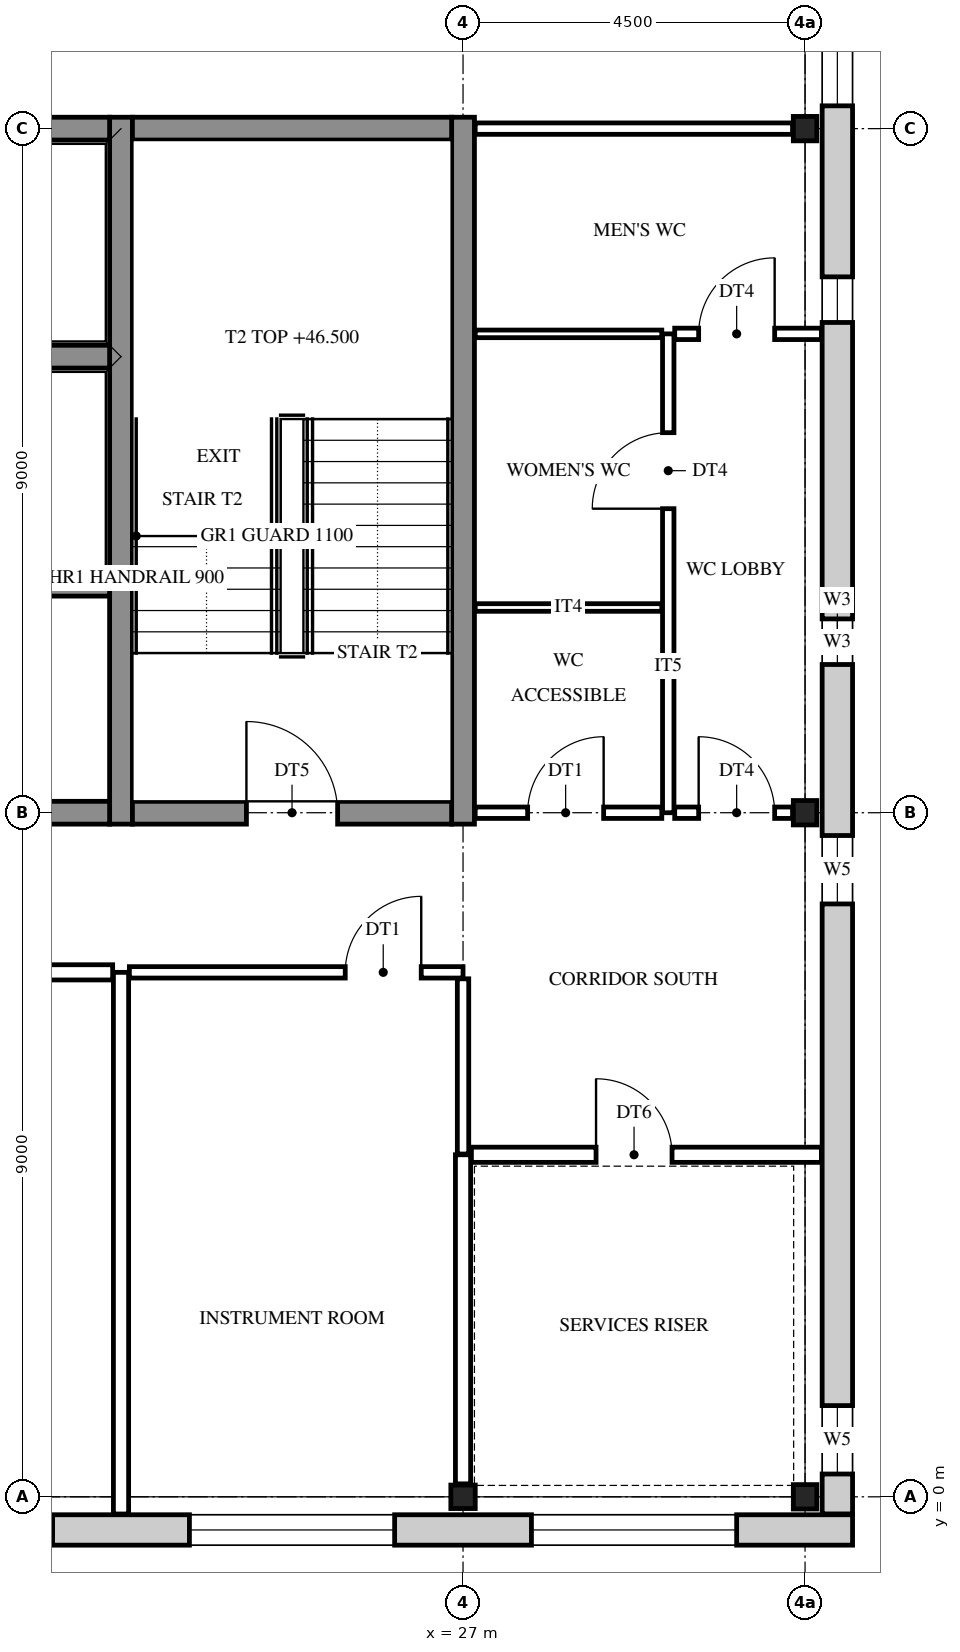
"""IFC4 building model, lengths in metres.
Left out: names, types, materials, properties, quantities, classifications, styles, units other than length and angle.
Written with IfcOpenShell. Run it as: python <this file> out.ifc"""

import sys

from ifc_helpers import new_model, si_unit, direction, frame, frame_2d, origin, origin_2d, place, context, subcontext, project, spatial, rectangle, i_section, extrude, element, fill, save


model = new_model("IFC4")
c1 = context("Model", 3, precision=1e-05, world=origin(), true_north=direction((0.0, 1.0)))
c2 = subcontext(c1, "Body", "Model", "MODEL_VIEW")
j1 = project(units=[si_unit("LENGTHUNIT", "METRE"), si_unit("PLANEANGLEUNIT", "RADIAN")], contexts=[c1])
p1 = place(None, origin())
s1 = spatial("IfcSite", under=j1, at=p1, CompositionType="ELEMENT")
p2 = place(p1, origin())
s2 = spatial("IfcBuilding", under=s1, at=p2, CompositionType="ELEMENT")
p3 = place(p2, frame((0.0, 0.0, 44.4)))
s3 = spatial("IfcBuildingStorey", under=s2, at=p3, CompositionType="ELEMENT", Elevation=44.4)
for number, where, z_axis, x_axis in (
    (1, (27.0, 0.0, 0.0), (0.0, 0.0, 1.0), (0.0, 1.0, 0.0)),
    (2, (31.5, 0.0, 0.0), (0.0, 0.0, 1.0), (1.0, 0.0, 0.0)),
    (3, (31.5, 9.0, 0.0), (0.0, 0.0, 1.0), (1.0, 0.0, 0.0)),
    (4, (31.5, 18.0, 0.0), (0.0, 0.0, 1.0), (1.0, 0.0, 0.0)),
):
    element("IfcColumn", number, at=place(p3, frame(where, z_axis=z_axis, x_axis=x_axis)), inside=s3, PredefinedType="COLUMN", context=c2, shape_type="SweptSolid", body=[
        extrude(i_section(OverallWidth=0.309, OverallDepth=0.321, WebThickness=0.014, FlangeThickness=0.022, FilletRadius=0.017, at=origin_2d()), origin(), (0.0, 0.0, 1.0), 4.2),
    ])
for number, where, z_axis, x_axis in (
    (5, (22.5, 8.85, 0.0), (0.0, 0.0, 1.0), (0.0, 1.0, 0.0)),
    (6, (27.0, 8.85, 0.0), (0.0, 0.0, 1.0), (0.0, 1.0, 0.0)),
):
    element("IfcWall", number, at=place(p3, frame(where, z_axis=z_axis, x_axis=x_axis)), inside=s3, PredefinedType="SHEAR", context=c2, shape_type="SweptSolid", body=[
        extrude(rectangle(XDim=9.3, YDim=0.3, at=frame_2d((4.65, 0.0))), origin(), (0.0, 0.0, 1.0), 4.2),
    ])
p4 = place(p3, frame((19.65, 9.0, 0.0), z_axis=(0.0, 0.0, 1.0), x_axis=(1.0, 0.0, 0.0)))
e7 = element("IfcWall", 7, at=p4, inside=s3, PredefinedType="SHEAR", context=c2, shape_type="SweptSolid", body=[
    extrude(rectangle(XDim=2.7, YDim=0.3, at=frame_2d((1.35, 0.0))), origin(), (0.0, 0.0, 1.0), 4.2),
])
p5 = place(p3, frame((22.65, 9.0, 0.0), z_axis=(0.0, 0.0, 1.0), x_axis=(1.0, 0.0, 0.0)))
e8 = element("IfcWall", 8, at=p5, inside=s3, PredefinedType="SHEAR", context=c2, shape_type="SweptSolid", body=[
    extrude(rectangle(XDim=4.2, YDim=0.3, at=frame_2d((2.1, 0.0))), origin(), (0.0, 0.0, 1.0), 4.2),
])
p6 = place(p5, frame((1.5, 0.0, 0.0)))
e9 = element("IfcOpeningElement", 9, at=p6, cuts=e8, PredefinedType="OPENING", context=c2, shape_type="SweptSolid", body=[
    extrude(rectangle(XDim=1.2, YDim=2.1, at=frame_2d((0.6, 1.05))), frame((0.0, 0.16, 0.0), z_axis=(0.0, -1.0, 0.0), x_axis=(1.0, 0.0, 0.0)), (0.0, 0.0, 1.0), 0.32),
])
for number, where, z_axis, x_axis in (
    (10, (19.65, 12.0, 0.0), (0.0, 0.0, 1.0), (1.0, 0.0, 0.0)),
    (11, (19.65, 15.0, 0.0), (0.0, 0.0, 1.0), (1.0, 0.0, 0.0)),
    (12, (19.65, 18.0, 0.0), (0.0, 0.0, 1.0), (1.0, 0.0, 0.0)),
):
    element("IfcWall", number, at=place(p3, frame(where, z_axis=z_axis, x_axis=x_axis)), inside=s3, PredefinedType="SHEAR", context=c2, shape_type="SweptSolid", body=[
        extrude(rectangle(XDim=2.7, YDim=0.3, at=frame_2d((1.35, 0.0))), origin(), (0.0, 0.0, 1.0), 4.2),
    ])
p7 = place(p3, frame((22.65, 18.0, 0.0), z_axis=(0.0, 0.0, 1.0), x_axis=(1.0, 0.0, 0.0)))
e13 = element("IfcWall", 13, at=p7, inside=s3, PredefinedType="SHEAR", context=c2, shape_type="SweptSolid", body=[
    extrude(rectangle(XDim=4.2, YDim=0.3, at=frame_2d((2.1, 0.0))), origin(), (0.0, 0.0, 1.0), 4.2),
])
p8 = place(p3, frame((32.125, -0.436, 0.0), z_axis=(0.0, 0.0, 1.0), x_axis=(-1.0, 0.0, 0.0)))
e14 = element("IfcWall", 14, at=p8, inside=s3, PredefinedType="STANDARD", context=c2, shape_type="SweptSolid", body=[
    extrude(rectangle(XDim=32.75, YDim=0.4, at=frame_2d((16.375, 0.0))), origin(), (0.0, 0.0, 1.0), 4.2),
])
p9 = place(p8, frame((28.525, 0.0, 0.9)))
e15 = element("IfcOpeningElement", 15, at=p9, cuts=e14, PredefinedType="OPENING", context=c2, shape_type="SweptSolid", body=[
    extrude(rectangle(XDim=2.7, YDim=2.5, at=frame_2d((1.35, 1.25))), frame((0.0, 0.21, 0.0), z_axis=(0.0, -1.0, 0.0), x_axis=(1.0, 0.0, 0.0)), (0.0, 0.0, 1.0), 0.42),
])
p10 = place(p8, frame((24.025, 0.0, 0.9)))
e16 = element("IfcOpeningElement", 16, at=p10, cuts=e14, PredefinedType="OPENING", context=c2, shape_type="SweptSolid", body=[
    extrude(rectangle(XDim=2.7, YDim=2.5, at=frame_2d((1.35, 1.25))), frame((0.0, 0.21, 0.0), z_axis=(0.0, -1.0, 0.0), x_axis=(1.0, 0.0, 0.0)), (0.0, 0.0, 1.0), 0.42),
])
p11 = place(p8, frame((19.525, 0.0, 0.9)))
e17 = element("IfcOpeningElement", 17, at=p11, cuts=e14, PredefinedType="OPENING", context=c2, shape_type="SweptSolid", body=[
    extrude(rectangle(XDim=2.7, YDim=2.5, at=frame_2d((1.35, 1.25))), frame((0.0, 0.21, 0.0), z_axis=(0.0, -1.0, 0.0), x_axis=(1.0, 0.0, 0.0)), (0.0, 0.0, 1.0), 0.42),
])
p12 = place(p8, frame((15.025, 0.0, 0.9)))
e18 = element("IfcOpeningElement", 18, at=p12, cuts=e14, PredefinedType="OPENING", context=c2, shape_type="SweptSolid", body=[
    extrude(rectangle(XDim=2.7, YDim=2.5, at=frame_2d((1.35, 1.25))), frame((0.0, 0.21, 0.0), z_axis=(0.0, -1.0, 0.0), x_axis=(1.0, 0.0, 0.0)), (0.0, 0.0, 1.0), 0.42),
])
p13 = place(p8, frame((10.525, 0.0, 0.9)))
e19 = element("IfcOpeningElement", 19, at=p13, cuts=e14, PredefinedType="OPENING", context=c2, shape_type="SweptSolid", body=[
    extrude(rectangle(XDim=2.7, YDim=2.5, at=frame_2d((1.35, 1.25))), frame((0.0, 0.21, 0.0), z_axis=(0.0, -1.0, 0.0), x_axis=(1.0, 0.0, 0.0)), (0.0, 0.0, 1.0), 0.42),
])
p14 = place(p8, frame((6.025, 0.0, 0.9)))
e20 = element("IfcOpeningElement", 20, at=p14, cuts=e14, PredefinedType="OPENING", context=c2, shape_type="SweptSolid", body=[
    extrude(rectangle(XDim=2.7, YDim=2.5, at=frame_2d((1.35, 1.25))), frame((0.0, 0.21, 0.0), z_axis=(0.0, -1.0, 0.0), x_axis=(1.0, 0.0, 0.0)), (0.0, 0.0, 1.0), 0.42),
])
p15 = place(p8, frame((1.525, 0.0, 0.9)))
e21 = element("IfcOpeningElement", 21, at=p15, cuts=e14, PredefinedType="OPENING", context=c2, shape_type="SweptSolid", body=[
    extrude(rectangle(XDim=2.7, YDim=2.5, at=frame_2d((1.35, 1.25))), frame((0.0, 0.21, 0.0), z_axis=(0.0, -1.0, 0.0), x_axis=(1.0, 0.0, 0.0)), (0.0, 0.0, 1.0), 0.42),
])
p16 = place(p3, frame((31.925, 27.225, 0.0), z_axis=(0.0, 0.0, 1.0), x_axis=(0.0, -1.0, 0.0)))
e22 = element("IfcWall", 22, at=p16, inside=s3, PredefinedType="STANDARD", context=c2, shape_type="SweptSolid", body=[
    extrude(rectangle(XDim=27.45, YDim=0.4, at=frame_2d((13.725, 0.0))), origin(), (0.0, 0.0, 1.0), 4.2),
])
p17 = place(p16, frame((26.025, 0.0, 0.9)))
e23 = element("IfcOpeningElement", 23, at=p17, cuts=e22, PredefinedType="OPENING", context=c2, shape_type="SweptSolid", body=[
    extrude(rectangle(XDim=0.9, YDim=2.0, at=frame_2d((0.45, 1.0))), frame((0.0, 0.21, 0.0), z_axis=(0.0, -1.0, 0.0), x_axis=(1.0, 0.0, 0.0)), (0.0, 0.0, 1.0), 0.42),
])
p18 = place(p16, frame((18.525, 0.0, 0.9)))
e24 = element("IfcOpeningElement", 24, at=p18, cuts=e22, PredefinedType="OPENING", context=c2, shape_type="SweptSolid", body=[
    extrude(rectangle(XDim=0.9, YDim=2.0, at=frame_2d((0.45, 1.0))), frame((0.0, 0.21, 0.0), z_axis=(0.0, -1.0, 0.0), x_axis=(1.0, 0.0, 0.0)), (0.0, 0.0, 1.0), 0.42),
])
p19 = place(p16, frame((15.675, 0.0, 1.6)))
e25 = element("IfcOpeningElement", 25, at=p19, cuts=e22, PredefinedType="OPENING", context=c2, shape_type="SweptSolid", body=[
    extrude(rectangle(XDim=0.6, YDim=0.9, at=frame_2d((0.3, 0.45))), frame((0.0, 0.21, 0.0), z_axis=(0.0, -1.0, 0.0), x_axis=(1.0, 0.0, 0.0)), (0.0, 0.0, 1.0), 0.42),
])
p20 = place(p16, frame((11.175, 0.0, 1.6)))
e26 = element("IfcOpeningElement", 26, at=p20, cuts=e22, PredefinedType="OPENING", context=c2, shape_type="SweptSolid", body=[
    extrude(rectangle(XDim=0.6, YDim=0.9, at=frame_2d((0.3, 0.45))), frame((0.0, 0.21, 0.0), z_axis=(0.0, -1.0, 0.0), x_axis=(1.0, 0.0, 0.0)), (0.0, 0.0, 1.0), 0.42),
])
p21 = place(p16, frame((8.025, 0.0, 0.9)))
e27 = element("IfcOpeningElement", 27, at=p21, cuts=e22, PredefinedType="OPENING", context=c2, shape_type="SweptSolid", body=[
    extrude(rectangle(XDim=0.9, YDim=2.0, at=frame_2d((0.45, 1.0))), frame((0.0, 0.21, 0.0), z_axis=(0.0, -1.0, 0.0), x_axis=(1.0, 0.0, 0.0)), (0.0, 0.0, 1.0), 0.42),
])
p22 = place(p16, frame((0.525, 0.0, 0.9)))
e28 = element("IfcOpeningElement", 28, at=p22, cuts=e22, PredefinedType="OPENING", context=c2, shape_type="SweptSolid", body=[
    extrude(rectangle(XDim=0.9, YDim=2.0, at=frame_2d((0.45, 1.0))), frame((0.0, 0.21, 0.0), z_axis=(0.0, -1.0, 0.0), x_axis=(1.0, 0.0, 0.0)), (0.0, 0.0, 1.0), 0.42),
])
p23 = place(p3, frame((22.5, -0.226, 0.0), z_axis=(0.0, 0.0, 1.0), x_axis=(0.0, 1.0, 0.0)))
e29 = element("IfcWall", 29, at=p23, inside=s3, PredefinedType="PARTITIONING", context=c2, shape_type="SweptSolid", body=[
    extrude(rectangle(XDim=7.126, YDim=0.2, at=frame_2d((3.563, 0.0))), origin(), (0.0, 0.0, 1.0), 3.542),
])
p24 = place(p3, frame((27.0, 0.17, 0.0), z_axis=(0.0, 0.0, 1.0), x_axis=(0.0, 1.0, 0.0)))
e30 = element("IfcWall", 30, at=p24, inside=s3, PredefinedType="PARTITIONING", context=c2, shape_type="SweptSolid", body=[
    extrude(rectangle(XDim=4.33, YDim=0.2, at=frame_2d((2.165, 0.0))), origin(), (0.0, 0.0, 1.0), 3.542),
])
p25 = place(p3, frame((27.0, 4.51, 0.0), z_axis=(0.0, 0.0, 1.0), x_axis=(0.0, 1.0, 0.0)))
e31 = element("IfcWall", 31, at=p25, inside=s3, PredefinedType="PARTITIONING", context=c2, shape_type="SweptSolid", body=[
    extrude(rectangle(XDim=2.305, YDim=0.15, at=frame_2d((1.152, 0.0))), origin(), (0.0, 0.0, 1.0), 3.542),
])
p26 = place(p3, frame((29.7, 9.0, 0.0), z_axis=(0.0, 0.0, 1.0), x_axis=(0.0, 1.0, 0.0)))
e32 = element("IfcWall", 32, at=p26, inside=s3, PredefinedType="PARTITIONING", context=c2, shape_type="SweptSolid", body=[
    extrude(rectangle(XDim=6.3, YDim=0.15, at=frame_2d((3.15, 0.0))), origin(), (0.0, 0.0, 1.0), 3.542),
])
p27 = place(p26, frame((4.0, 0.0, 0.0)))
e33 = element("IfcOpeningElement", 33, at=p27, cuts=e32, PredefinedType="OPENING", context=c2, shape_type="SweptSolid", body=[
    extrude(rectangle(XDim=1.0, YDim=2.1, at=frame_2d((0.5, 1.05))), frame((0.0, 0.085, 0.0), z_axis=(0.0, -1.0, 0.0), x_axis=(1.0, 0.0, 0.0)), (0.0, 0.0, 1.0), 0.17),
])
p28 = place(p3, frame((27.11, 4.5, 0.0), z_axis=(0.0, 0.0, 1.0), x_axis=(1.0, 0.0, 0.0)))
e34 = element("IfcWall", 34, at=p28, inside=s3, PredefinedType="PARTITIONING", context=c2, shape_type="SweptSolid", body=[
    extrude(rectangle(XDim=4.605, YDim=0.2, at=frame_2d((2.302, 0.0))), origin(), (0.0, 0.0, 1.0), 3.542),
])
p29 = place(p28, frame((1.64, 0.0, 0.0)))
e35 = element("IfcOpeningElement", 35, at=p29, cuts=e34, PredefinedType="OPENING", context=c2, shape_type="SweptSolid", body=[
    extrude(rectangle(XDim=1.0, YDim=2.1, at=frame_2d((0.5, 1.05))), frame((0.0, 0.11, 0.0), z_axis=(0.0, -1.0, 0.0), x_axis=(1.0, 0.0, 0.0)), (0.0, 0.0, 1.0), 0.22),
])
p30 = place(p3, frame((18.01, 6.9, 0.0), z_axis=(0.0, 0.0, 1.0), x_axis=(1.0, 0.0, 0.0)))
e36 = element("IfcWall", 36, at=p30, inside=s3, PredefinedType="PARTITIONING", context=c2, shape_type="SweptSolid", body=[
    extrude(rectangle(XDim=4.38, YDim=0.2, at=frame_2d((2.19, 0.0))), origin(), (0.0, 0.0, 1.0), 3.542),
])
p31 = place(p30, frame((1.74, 0.0, 0.0)))
e37 = element("IfcOpeningElement", 37, at=p31, cuts=e36, PredefinedType="OPENING", context=c2, shape_type="SweptSolid", body=[
    extrude(rectangle(XDim=1.0, YDim=2.1, at=frame_2d((0.5, 1.05))), frame((0.0, 0.11, 0.0), z_axis=(0.0, -1.0, 0.0), x_axis=(1.0, 0.0, 0.0)), (0.0, 0.0, 1.0), 0.22),
])
p32 = place(p3, frame((22.61, 6.9, 0.0), z_axis=(0.0, 0.0, 1.0), x_axis=(1.0, 0.0, 0.0)))
e38 = element("IfcWall", 38, at=p32, inside=s3, PredefinedType="PARTITIONING", context=c2, shape_type="SweptSolid", body=[
    extrude(rectangle(XDim=4.39, YDim=0.15, at=frame_2d((2.195, 0.0))), origin(), (0.0, 0.0, 1.0), 3.542),
])
p33 = place(p32, frame((2.84, 0.0, 0.0)))
e39 = element("IfcOpeningElement", 39, at=p33, cuts=e38, PredefinedType="OPENING", context=c2, shape_type="SweptSolid", body=[
    extrude(rectangle(XDim=1.0, YDim=2.1, at=frame_2d((0.5, 1.05))), frame((0.0, 0.085, 0.0), z_axis=(0.0, -1.0, 0.0), x_axis=(1.0, 0.0, 0.0)), (0.0, 0.0, 1.0), 0.17),
])
p34 = place(p3, frame((27.16, 9.0, 0.0), z_axis=(0.0, 0.0, 1.0), x_axis=(1.0, 0.0, 0.0)))
e40 = element("IfcWall", 40, at=p34, inside=s3, PredefinedType="PARTITIONING", context=c2, shape_type="SweptSolid", body=[
    extrude(rectangle(XDim=2.455, YDim=0.15, at=frame_2d((1.228, 0.0))), origin(), (0.0, 0.0, 1.0), 3.542),
])
p35 = place(p34, frame((0.69, 0.0, 0.0)))
e41 = element("IfcOpeningElement", 41, at=p35, cuts=e40, PredefinedType="OPENING", context=c2, shape_type="SweptSolid", body=[
    extrude(rectangle(XDim=1.0, YDim=2.1, at=frame_2d((0.5, 1.05))), frame((0.0, 0.085, 0.0), z_axis=(0.0, -1.0, 0.0), x_axis=(1.0, 0.0, 0.0)), (0.0, 0.0, 1.0), 0.17),
])
p36 = place(p3, frame((29.785, 9.0, 0.0), z_axis=(0.0, 0.0, 1.0), x_axis=(1.0, 0.0, 0.0)))
e42 = element("IfcWall", 42, at=p36, inside=s3, PredefinedType="PARTITIONING", context=c2, shape_type="SweptSolid", body=[
    extrude(rectangle(XDim=1.551, YDim=0.15, at=frame_2d((0.775, 0.0))), origin(), (0.0, 0.0, 1.0), 3.542),
])
p37 = place(p36, frame((0.315, 0.0, 0.0)))
e43 = element("IfcOpeningElement", 43, at=p37, cuts=e42, PredefinedType="OPENING", context=c2, shape_type="SweptSolid", body=[
    extrude(rectangle(XDim=1.0, YDim=2.1, at=frame_2d((0.5, 1.05))), frame((0.0, 0.085, 0.0), z_axis=(0.0, -1.0, 0.0), x_axis=(1.0, 0.0, 0.0)), (0.0, 0.0, 1.0), 0.17),
])
for number, where, z_axis, x_axis in (
    (44, (27.16, 11.7, 0.0), (0.0, 0.0, 1.0), (1.0, 0.0, 0.0)),
    (45, (27.16, 15.3, 0.0), (0.0, 0.0, 1.0), (1.0, 0.0, 0.0)),
):
    element("IfcWall", number, at=place(p3, frame(where, z_axis=z_axis, x_axis=x_axis)), inside=s3, PredefinedType="PARTITIONING", context=c2, shape_type="SweptSolid", body=[
        extrude(rectangle(XDim=2.455, YDim=0.1, at=frame_2d((1.228, 0.0))), origin(), (0.0, 0.0, 1.0), 3.542),
    ])
p38 = place(p3, frame((29.785, 15.3, 0.0), z_axis=(0.0, 0.0, 1.0), x_axis=(1.0, 0.0, 0.0)))
e46 = element("IfcWall", 46, at=p38, inside=s3, PredefinedType="PARTITIONING", context=c2, shape_type="SweptSolid", body=[
    extrude(rectangle(XDim=1.93, YDim=0.15, at=frame_2d((0.965, 0.0))), origin(), (0.0, 0.0, 1.0), 3.542),
])
p39 = place(p38, frame((0.315, 0.0, 0.0)))
e47 = element("IfcOpeningElement", 47, at=p39, cuts=e46, PredefinedType="OPENING", context=c2, shape_type="SweptSolid", body=[
    extrude(rectangle(XDim=1.0, YDim=2.1, at=frame_2d((0.5, 1.05))), frame((0.0, 0.085, 0.0), z_axis=(0.0, -1.0, 0.0), x_axis=(1.0, 0.0, 0.0)), (0.0, 0.0, 1.0), 0.17),
])
p40 = place(p3, frame((27.16, 18.0, 0.0), z_axis=(0.0, 0.0, 1.0), x_axis=(1.0, 0.0, 0.0)))
e48 = element("IfcWall", 48, at=p40, inside=s3, PredefinedType="PARTITIONING", context=c2, shape_type="SweptSolid", body=[
    extrude(rectangle(XDim=4.176, YDim=0.15, at=frame_2d((2.088, 0.0))), origin(), (0.0, 0.0, 1.0), 3.542),
])
p41 = place(p14, origin())
e49 = element("IfcWindow", 49, at=p41, inside=s3, PartitioningType="SINGLE_PANEL", PredefinedType="WINDOW", context=c2, shape_type="SweptSolid", body=[
    extrude(rectangle(XDim=2.7, YDim=2.5, at=frame_2d((1.35, 1.25))), frame((0.0, 0.03, 0.0), z_axis=(0.0, -1.0, 0.0), x_axis=(1.0, 0.0, 0.0)), (0.0, 0.0, 1.0), 0.06),
])
fill(e20, e49)
p42 = place(p15, origin())
e50 = element("IfcWindow", 50, at=p42, inside=s3, PartitioningType="SINGLE_PANEL", PredefinedType="WINDOW", context=c2, shape_type="SweptSolid", body=[
    extrude(rectangle(XDim=2.7, YDim=2.5, at=frame_2d((1.35, 1.25))), frame((0.0, 0.03, 0.0), z_axis=(0.0, -1.0, 0.0), x_axis=(1.0, 0.0, 0.0)), (0.0, 0.0, 1.0), 0.06),
])
fill(e21, e50)
p43 = place(p17, origin())
e51 = element("IfcWindow", 51, at=p43, inside=s3, PartitioningType="SINGLE_PANEL", PredefinedType="WINDOW", context=c2, shape_type="SweptSolid", body=[
    extrude(rectangle(XDim=0.9, YDim=2.0, at=frame_2d((0.45, 1.0))), frame((0.0, 0.03, 0.0), z_axis=(0.0, -1.0, 0.0), x_axis=(1.0, 0.0, 0.0)), (0.0, 0.0, 1.0), 0.06),
])
fill(e23, e51)
p44 = place(p18, origin())
e52 = element("IfcWindow", 52, at=p44, inside=s3, PartitioningType="SINGLE_PANEL", PredefinedType="WINDOW", context=c2, shape_type="SweptSolid", body=[
    extrude(rectangle(XDim=0.9, YDim=2.0, at=frame_2d((0.45, 1.0))), frame((0.0, 0.03, 0.0), z_axis=(0.0, -1.0, 0.0), x_axis=(1.0, 0.0, 0.0)), (0.0, 0.0, 1.0), 0.06),
])
fill(e24, e52)
p45 = place(p19, origin())
e53 = element("IfcWindow", 53, at=p45, inside=s3, PartitioningType="SINGLE_PANEL", PredefinedType="WINDOW", context=c2, shape_type="SweptSolid", body=[
    extrude(rectangle(XDim=0.6, YDim=0.9, at=frame_2d((0.3, 0.45))), frame((0.0, 0.03, 0.0), z_axis=(0.0, -1.0, 0.0), x_axis=(1.0, 0.0, 0.0)), (0.0, 0.0, 1.0), 0.06),
])
fill(e25, e53)
p46 = place(p20, origin())
e54 = element("IfcWindow", 54, at=p46, inside=s3, PartitioningType="SINGLE_PANEL", PredefinedType="WINDOW", context=c2, shape_type="SweptSolid", body=[
    extrude(rectangle(XDim=0.6, YDim=0.9, at=frame_2d((0.3, 0.45))), frame((0.0, 0.03, 0.0), z_axis=(0.0, -1.0, 0.0), x_axis=(1.0, 0.0, 0.0)), (0.0, 0.0, 1.0), 0.06),
])
fill(e26, e54)
p47 = place(p21, origin())
e55 = element("IfcWindow", 55, at=p47, inside=s3, PartitioningType="SINGLE_PANEL", PredefinedType="WINDOW", context=c2, shape_type="SweptSolid", body=[
    extrude(rectangle(XDim=0.9, YDim=2.0, at=frame_2d((0.45, 1.0))), frame((0.0, 0.03, 0.0), z_axis=(0.0, -1.0, 0.0), x_axis=(1.0, 0.0, 0.0)), (0.0, 0.0, 1.0), 0.06),
])
fill(e27, e55)
p48 = place(p6, origin())
e56 = element("IfcDoor", 56, at=p48, inside=s3, OperationType="SINGLE_SWING_LEFT", PredefinedType="DOOR", context=c2, shape_type="SweptSolid", body=[
    extrude(rectangle(XDim=1.2, YDim=2.1, at=frame_2d((0.6, 1.05))), frame((0.0, 0.025, 0.0), z_axis=(0.0, -1.0, 0.0), x_axis=(1.0, 0.0, 0.0)), (0.0, 0.0, 1.0), 0.05),
])
fill(e9, e56)
p49 = place(p35, origin())
e57 = element("IfcDoor", 57, at=p49, inside=s3, OperationType="SINGLE_SWING_RIGHT", PredefinedType="DOOR", context=c2, shape_type="SweptSolid", body=[
    extrude(rectangle(XDim=1.0, YDim=2.1, at=frame_2d((0.5, 1.05))), frame((0.0, 0.025, 0.0), z_axis=(0.0, -1.0, 0.0), x_axis=(1.0, 0.0, 0.0)), (0.0, 0.0, 1.0), 0.05),
])
fill(e41, e57)
p50 = place(p27, origin())
e58 = element("IfcDoor", 58, at=p50, inside=s3, OperationType="SINGLE_SWING_LEFT", PredefinedType="DOOR", context=c2, shape_type="SweptSolid", body=[
    extrude(rectangle(XDim=1.0, YDim=2.1, at=frame_2d((0.5, 1.05))), frame((0.0, 0.025, 0.0), z_axis=(0.0, -1.0, 0.0), x_axis=(1.0, 0.0, 0.0)), (0.0, 0.0, 1.0), 0.05),
])
fill(e33, e58)
p51 = place(p39, origin())
e59 = element("IfcDoor", 59, at=p51, inside=s3, OperationType="SINGLE_SWING_RIGHT", PredefinedType="DOOR", context=c2, shape_type="SweptSolid", body=[
    extrude(rectangle(XDim=1.0, YDim=2.1, at=frame_2d((0.5, 1.05))), frame((0.0, 0.025, 0.0), z_axis=(0.0, -1.0, 0.0), x_axis=(1.0, 0.0, 0.0)), (0.0, 0.0, 1.0), 0.05),
])
fill(e47, e59)
p52 = place(p37, origin())
e60 = element("IfcDoor", 60, at=p52, inside=s3, OperationType="SINGLE_SWING_LEFT", PredefinedType="DOOR", context=c2, shape_type="SweptSolid", body=[
    extrude(rectangle(XDim=1.0, YDim=2.1, at=frame_2d((0.5, 1.05))), frame((0.0, 0.025, 0.0), z_axis=(0.0, -1.0, 0.0), x_axis=(1.0, 0.0, 0.0)), (0.0, 0.0, 1.0), 0.05),
])
fill(e43, e60)
p53 = place(p29, frame((1.0, 0.0, 0.0), z_axis=(0.0, 0.0, 1.0), x_axis=(-1.0, 0.0, 0.0)))
e61 = element("IfcDoor", 61, at=p53, inside=s3, OperationType="SINGLE_SWING_LEFT", PredefinedType="DOOR", context=c2, shape_type="SweptSolid", body=[
    extrude(rectangle(XDim=1.0, YDim=2.1, at=frame_2d((0.5, 1.05))), frame((0.0, 0.025, 0.0), z_axis=(0.0, -1.0, 0.0), x_axis=(1.0, 0.0, 0.0)), (0.0, 0.0, 1.0), 0.05),
])
fill(e35, e61)
p54 = place(p33, frame((1.0, 0.0, 0.0), z_axis=(0.0, 0.0, 1.0), x_axis=(-1.0, 0.0, 0.0)))
e62 = element("IfcDoor", 62, at=p54, inside=s3, OperationType="SINGLE_SWING_RIGHT", PredefinedType="DOOR", context=c2, shape_type="SweptSolid", body=[
    extrude(rectangle(XDim=1.0, YDim=2.1, at=frame_2d((0.5, 1.05))), frame((0.0, 0.025, 0.0), z_axis=(0.0, -1.0, 0.0), x_axis=(1.0, 0.0, 0.0)), (0.0, 0.0, 1.0), 0.05),
])
fill(e39, e62)
save(model, sys.argv[1])
